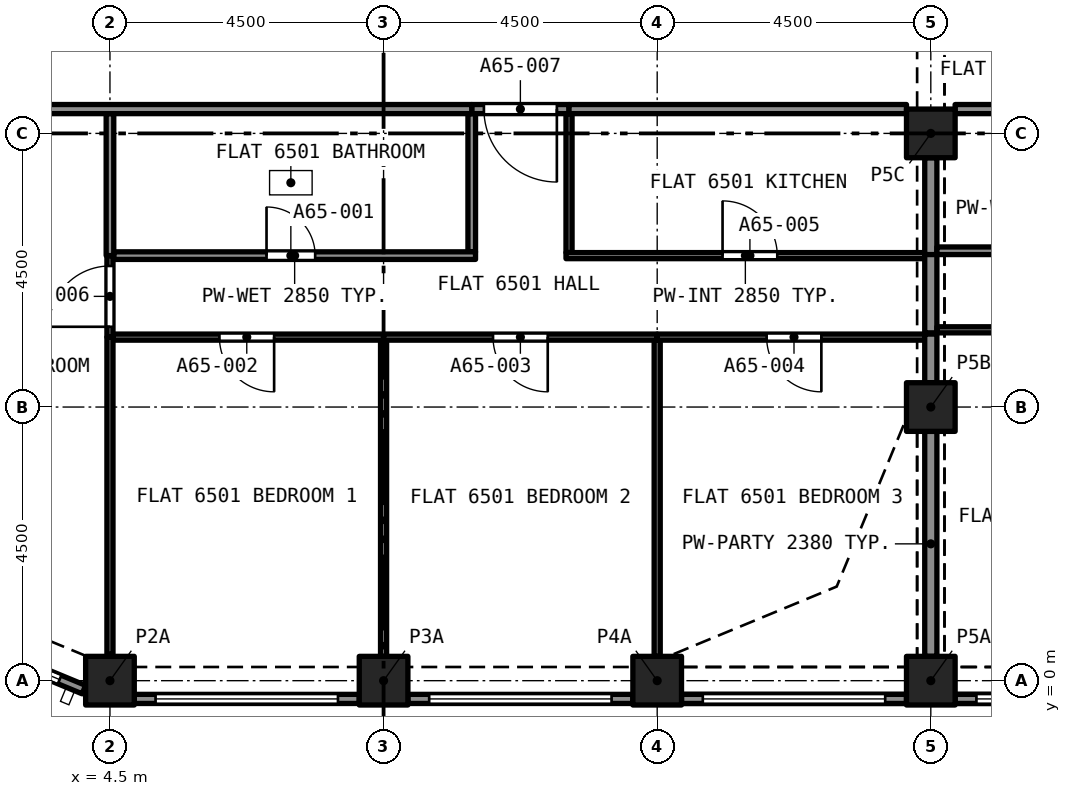
"""IFC4 building model, lengths in metres.
Left out: names, types, materials, properties, quantities, classifications, styles, units other than length and angle.
Written with IfcOpenShell. Run it as: python <this file> out.ifc"""

import sys

from ifc_helpers import new_model, si_unit, direction, frame, frame_2d, origin, origin_2d, place, context, subcontext, project, spatial, rectangle, extrude, element, fill, save


model = new_model("IFC4")
c1 = context("Model", 3, precision=1e-05, world=origin(), true_north=direction((0.0, 1.0)))
c2 = subcontext(c1, "Body", "Model", "MODEL_VIEW")
j1 = project(units=[si_unit("LENGTHUNIT", "METRE"), si_unit("PLANEANGLEUNIT", "RADIAN")], contexts=[c1])
p1 = place(None, origin())
s1 = spatial("IfcSite", under=j1, at=p1, CompositionType="ELEMENT")
p2 = place(p1, origin())
s2 = spatial("IfcBuilding", under=s1, at=p2, CompositionType="ELEMENT")
p3 = place(p2, frame((0.0, 0.0, 232.495)))
s3 = spatial("IfcBuildingStorey", under=s2, at=p3, CompositionType="ELEMENT", Elevation=232.495)
for number, where, z_axis, x_axis in (
    (1, (4.5, 0.0, 0.0), (0.0, 0.0, 1.0), (1.0, 0.0, 0.0)),
    (2, (9.0, 0.0, 0.0), (0.0, 0.0, 1.0), (1.0, 0.0, 0.0)),
    (3, (13.5, 0.0, 0.0), (0.0, 0.0, 1.0), (1.0, 0.0, 0.0)),
    (4, (18.0, 0.0, 0.0), (0.0, 0.0, 1.0), (1.0, 0.0, 0.0)),
    (5, (18.0, 4.5, 0.0), (0.0, 0.0, 1.0), (1.0, 0.0, 0.0)),
    (6, (18.0, 9.0, 0.0), (0.0, 0.0, 1.0), (1.0, 0.0, 0.0)),
):
    element("IfcColumn", number, at=place(p3, frame(where, z_axis=z_axis, x_axis=x_axis)), inside=s3, PredefinedType="COLUMN", context=c2, shape_type="SweptSolid", body=[
        extrude(rectangle(XDim=0.8, YDim=0.8, at=origin_2d()), origin(), (0.0, 0.0, 1.0), 3.2),
    ])
p4 = place(p3, frame((4.071, -0.147, 0.0), z_axis=(0.0, 0.0, 1.0), x_axis=(-0.923885342263, 0.382669406082, 0.0)))
e7 = element("IfcWall", 7, at=p4, inside=s3, PredefinedType="SOLIDWALL", context=c2, shape_type="SweptSolid", body=[
    extrude(rectangle(XDim=2.602, YDim=0.15, at=frame_2d((1.301, 0.0))), origin(), (0.0, 0.0, 1.0), 3.2),
])
p5 = place(p4, frame((0.432, 0.0, 0.45)))
e8 = element("IfcOpeningElement", 8, at=p5, cuts=e7, PredefinedType="OPENING", context=c2, shape_type="SweptSolid", body=[
    extrude(rectangle(XDim=1.9, YDim=1.95, at=frame_2d((0.95, 0.975))), frame((0.0, 0.085, 0.0), z_axis=(0.0, -1.0, 0.0), x_axis=(1.0, 0.0, 0.0)), (0.0, 0.0, 1.0), 0.17),
])
p6 = place(p3, frame((8.6, -0.3, 0.0), z_axis=(0.0, 0.0, 1.0), x_axis=(-1.0, 0.0, 0.0)))
e9 = element("IfcWall", 9, at=p6, inside=s3, PredefinedType="SOLIDWALL", context=c2, shape_type="SweptSolid", body=[
    extrude(rectangle(XDim=3.7, YDim=0.15, at=frame_2d((1.85, 0.0))), origin(), (0.0, 0.0, 1.0), 3.2),
])
p7 = place(p6, frame((0.35, 0.0, 0.45)))
e10 = element("IfcOpeningElement", 10, at=p7, cuts=e9, PredefinedType="OPENING", context=c2, shape_type="SweptSolid", body=[
    extrude(rectangle(XDim=3.0, YDim=1.95, at=frame_2d((1.5, 0.975))), frame((0.0, 0.085, 0.0), z_axis=(0.0, -1.0, 0.0), x_axis=(1.0, 0.0, 0.0)), (0.0, 0.0, 1.0), 0.17),
])
p8 = place(p3, frame((13.1, -0.3, 0.0), z_axis=(0.0, 0.0, 1.0), x_axis=(-1.0, 0.0, 0.0)))
e11 = element("IfcWall", 11, at=p8, inside=s3, PredefinedType="SOLIDWALL", context=c2, shape_type="SweptSolid", body=[
    extrude(rectangle(XDim=3.7, YDim=0.15, at=frame_2d((1.85, 0.0))), origin(), (0.0, 0.0, 1.0), 3.2),
])
p9 = place(p8, frame((0.35, 0.0, 0.45)))
e12 = element("IfcOpeningElement", 12, at=p9, cuts=e11, PredefinedType="OPENING", context=c2, shape_type="SweptSolid", body=[
    extrude(rectangle(XDim=3.0, YDim=1.95, at=frame_2d((1.5, 0.975))), frame((0.0, 0.085, 0.0), z_axis=(0.0, -1.0, 0.0), x_axis=(1.0, 0.0, 0.0)), (0.0, 0.0, 1.0), 0.17),
])
p10 = place(p3, frame((17.6, -0.3, 0.0), z_axis=(0.0, 0.0, 1.0), x_axis=(-1.0, 0.0, 0.0)))
e13 = element("IfcWall", 13, at=p10, inside=s3, PredefinedType="SOLIDWALL", context=c2, shape_type="SweptSolid", body=[
    extrude(rectangle(XDim=3.7, YDim=0.15, at=frame_2d((1.85, 0.0))), origin(), (0.0, 0.0, 1.0), 3.2),
])
p11 = place(p10, frame((0.35, 0.0, 0.45)))
e14 = element("IfcOpeningElement", 14, at=p11, cuts=e13, PredefinedType="OPENING", context=c2, shape_type="SweptSolid", body=[
    extrude(rectangle(XDim=3.0, YDim=1.95, at=frame_2d((1.5, 0.975))), frame((0.0, 0.085, 0.0), z_axis=(0.0, -1.0, 0.0), x_axis=(1.0, 0.0, 0.0)), (0.0, 0.0, 1.0), 0.17),
])
p12 = place(p3, frame((22.1, -0.3, 0.0), z_axis=(0.0, 0.0, 1.0), x_axis=(-1.0, 0.0, 0.0)))
e15 = element("IfcWall", 15, at=p12, inside=s3, PredefinedType="SOLIDWALL", context=c2, shape_type="SweptSolid", body=[
    extrude(rectangle(XDim=3.7, YDim=0.15, at=frame_2d((1.85, 0.0))), origin(), (0.0, 0.0, 1.0), 3.2),
])
p13 = place(p12, frame((0.35, 0.0, 0.45)))
e16 = element("IfcOpeningElement", 16, at=p13, cuts=e15, PredefinedType="OPENING", context=c2, shape_type="SweptSolid", body=[
    extrude(rectangle(XDim=3.0, YDim=1.95, at=frame_2d((1.5, 0.975))), frame((0.0, 0.085, 0.0), z_axis=(0.0, -1.0, 0.0), x_axis=(1.0, 0.0, 0.0)), (0.0, 0.0, 1.0), 0.17),
])
for number, where, z_axis, x_axis in (
    (17, (17.6, -0.3, 3.2), (0.0, 0.0, 1.0), (-1.0, 0.0, 0.0)),
    (18, (22.1, -0.3, 3.2), (0.0, 0.0, 1.0), (-1.0, 0.0, 0.0)),
):
    element("IfcWall", number, at=place(p3, frame(where, z_axis=z_axis, x_axis=x_axis)), inside=s3, PredefinedType="PARAPET", context=c2, shape_type="SweptSolid", body=[
        extrude(rectangle(XDim=3.7, YDim=0.15, at=frame_2d((1.85, 0.0))), origin(), (0.0, 0.0, 1.0), 1.1),
    ])
p14 = place(p3, frame((10.45, 7.052, 0.0), z_axis=(0.0, 0.0, 1.0), x_axis=(0.0, 1.0, 0.0)))
e19 = element("IfcWall", 19, at=p14, inside=s3, PredefinedType="PARTITIONING", context=c2, shape_type="SweptSolid", body=[
    extrude(rectangle(XDim=2.272, YDim=0.125, at=frame_2d((1.136, 0.0))), origin(), (0.0, 0.0, 1.0), 2.85),
])
p15 = place(p3, frame((4.562, 6.99, 0.0), z_axis=(0.0, 0.0, 1.0), x_axis=(1.0, 0.0, 0.0)))
e20 = element("IfcWall", 20, at=p15, inside=s3, PredefinedType="PARTITIONING", context=c2, shape_type="SweptSolid", body=[
    extrude(rectangle(XDim=5.95, YDim=0.125, at=frame_2d((2.975, 0.0))), origin(), (0.0, 0.0, 1.0), 2.85),
])
p16 = place(p15, frame((2.512, 0.0, 0.0)))
e21 = element("IfcOpeningElement", 21, at=p16, cuts=e20, PredefinedType="OPENING", context=c2, shape_type="SweptSolid", body=[
    extrude(rectangle(XDim=0.8, YDim=2.1, at=frame_2d((0.4, 1.05))), frame((0.0, 0.073, 0.0), z_axis=(0.0, -1.0, 0.0), x_axis=(1.0, 0.0, 0.0)), (0.0, 0.0, 1.0), 0.145),
])
p17 = place(p3, frame((4.5, 6.99, 0.0), z_axis=(0.0, 0.0, 1.0), x_axis=(0.0, 1.0, 0.0)))
e22 = element("IfcWall", 22, at=p17, inside=s3, PredefinedType="PARTITIONING", context=c2, shape_type="SweptSolid", body=[
    extrude(rectangle(XDim=2.335, YDim=0.125, at=frame_2d((1.167, 0.0))), origin(), (0.0, 0.0, 1.0), 2.85),
])
p18 = place(p3, frame((9.0, 0.4, 0.0), z_axis=(0.0, 0.0, 1.0), x_axis=(0.0, 1.0, 0.0)))
e23 = element("IfcWall", 23, at=p18, inside=s3, PredefinedType="PARTITIONING", context=c2, shape_type="SweptSolid", body=[
    extrude(rectangle(XDim=5.2, YDim=0.1, at=frame_2d((2.6, 0.0))), origin(), (0.0, 0.0, 1.0), 2.85),
])
p19 = place(p3, frame((9.0, 5.65, 0.0), z_axis=(0.0, 0.0, 1.0), x_axis=(-1.0, 0.0, 0.0)))
e24 = element("IfcWall", 24, at=p19, inside=s3, PredefinedType="PARTITIONING", context=c2, shape_type="SweptSolid", body=[
    extrude(rectangle(XDim=4.45, YDim=0.1, at=frame_2d((2.225, 0.0))), origin(), (0.0, 0.0, 1.0), 2.85),
])
p20 = place(p19, frame((1.8, 0.0, 0.0)))
e25 = element("IfcOpeningElement", 25, at=p20, cuts=e24, PredefinedType="OPENING", context=c2, shape_type="SweptSolid", body=[
    extrude(rectangle(XDim=0.9, YDim=2.1, at=frame_2d((0.45, 1.05))), frame((0.0, 0.06, 0.0), z_axis=(0.0, -1.0, 0.0), x_axis=(1.0, 0.0, 0.0)), (0.0, 0.0, 1.0), 0.12),
])
p21 = place(p3, frame((4.5, 0.433, 0.0), z_axis=(0.0, 0.0, 1.0), x_axis=(0.0, 1.0, 0.0)))
e26 = element("IfcWall", 26, at=p21, inside=s3, PredefinedType="PARTITIONING", context=c2, shape_type="SweptSolid", body=[
    extrude(rectangle(XDim=5.217, YDim=0.1, at=frame_2d((2.608, 0.0))), origin(), (0.0, 0.0, 1.0), 2.85),
])
p22 = place(p3, frame((13.5, 0.4, 0.0), z_axis=(0.0, 0.0, 1.0), x_axis=(0.0, 1.0, 0.0)))
e27 = element("IfcWall", 27, at=p22, inside=s3, PredefinedType="PARTITIONING", context=c2, shape_type="SweptSolid", body=[
    extrude(rectangle(XDim=5.2, YDim=0.1, at=frame_2d((2.6, 0.0))), origin(), (0.0, 0.0, 1.0), 2.85),
])
p23 = place(p3, frame((13.5, 5.65, 0.0), z_axis=(0.0, 0.0, 1.0), x_axis=(-1.0, 0.0, 0.0)))
e28 = element("IfcWall", 28, at=p23, inside=s3, PredefinedType="PARTITIONING", context=c2, shape_type="SweptSolid", body=[
    extrude(rectangle(XDim=4.5, YDim=0.1, at=frame_2d((2.25, 0.0))), origin(), (0.0, 0.0, 1.0), 2.85),
])
p24 = place(p23, frame((1.8, 0.0, 0.0)))
e29 = element("IfcOpeningElement", 29, at=p24, cuts=e28, PredefinedType="OPENING", context=c2, shape_type="SweptSolid", body=[
    extrude(rectangle(XDim=0.9, YDim=2.1, at=frame_2d((0.45, 1.05))), frame((0.0, 0.06, 0.0), z_axis=(0.0, -1.0, 0.0), x_axis=(1.0, 0.0, 0.0)), (0.0, 0.0, 1.0), 0.12),
])
p25 = place(p3, frame((17.9, 5.65, 0.0), z_axis=(0.0, 0.0, 1.0), x_axis=(-1.0, 0.0, 0.0)))
e30 = element("IfcWall", 30, at=p25, inside=s3, PredefinedType="PARTITIONING", context=c2, shape_type="SweptSolid", body=[
    extrude(rectangle(XDim=4.4, YDim=0.1, at=frame_2d((2.2, 0.0))), origin(), (0.0, 0.0, 1.0), 2.85),
])
p26 = place(p25, frame((1.7, 0.0, 0.0)))
e31 = element("IfcOpeningElement", 31, at=p26, cuts=e30, PredefinedType="OPENING", context=c2, shape_type="SweptSolid", body=[
    extrude(rectangle(XDim=0.9, YDim=2.1, at=frame_2d((0.45, 1.05))), frame((0.0, 0.06, 0.0), z_axis=(0.0, -1.0, 0.0), x_axis=(1.0, 0.0, 0.0)), (0.0, 0.0, 1.0), 0.12),
])
p27 = place(p3, frame((18.0, 4.9, 0.0), z_axis=(0.0, 0.0, 1.0), x_axis=(0.0, 1.0, 0.0)))
e32 = element("IfcWall", 32, at=p27, inside=s3, PredefinedType="PARTITIONING", context=c2, shape_type="SweptSolid", body=[
    extrude(rectangle(XDim=0.8, YDim=0.2, at=frame_2d((0.4, 0.0))), origin(), (0.0, 0.0, 1.0), 2.38),
])
p28 = place(p3, frame((18.0, 0.4, 0.0), z_axis=(0.0, 0.0, 1.0), x_axis=(0.0, 1.0, 0.0)))
e33 = element("IfcWall", 33, at=p28, inside=s3, PredefinedType="PARTITIONING", context=c2, shape_type="SweptSolid", body=[
    extrude(rectangle(XDim=3.7, YDim=0.2, at=frame_2d((1.85, 0.0))), origin(), (0.0, 0.0, 1.0), 2.38),
])
p29 = place(p3, frame((12.05, 7.04, 0.0), z_axis=(0.0, 0.0, 1.0), x_axis=(0.0, 1.0, 0.0)))
e34 = element("IfcWall", 34, at=p29, inside=s3, PredefinedType="PARTITIONING", context=c2, shape_type="SweptSolid", body=[
    extrude(rectangle(XDim=2.285, YDim=0.1, at=frame_2d((1.143, 0.0))), origin(), (0.0, 0.0, 1.0), 2.85),
])
p30 = place(p3, frame((12.0, 6.99, 0.0), z_axis=(0.0, 0.0, 1.0), x_axis=(1.0, 0.0, 0.0)))
e35 = element("IfcWall", 35, at=p30, inside=s3, PredefinedType="PARTITIONING", context=c2, shape_type="SweptSolid", body=[
    extrude(rectangle(XDim=5.9, YDim=0.1, at=frame_2d((2.95, 0.0))), origin(), (0.0, 0.0, 1.0), 2.85),
])
p31 = place(p30, frame((2.575, 0.0, 0.0)))
e36 = element("IfcOpeningElement", 36, at=p31, cuts=e35, PredefinedType="OPENING", context=c2, shape_type="SweptSolid", body=[
    extrude(rectangle(XDim=0.9, YDim=2.1, at=frame_2d((0.45, 1.05))), frame((0.0, 0.06, 0.0), z_axis=(0.0, -1.0, 0.0), x_axis=(1.0, 0.0, 0.0)), (0.0, 0.0, 1.0), 0.12),
])
p32 = place(p3, frame((4.5, 5.65, 0.0), z_axis=(0.0, 0.0, 1.0), x_axis=(0.0, 1.0, 0.0)))
e37 = element("IfcWall", 37, at=p32, inside=s3, PredefinedType="PARTITIONING", context=c2, shape_type="SweptSolid", body=[
    extrude(rectangle(XDim=1.34, YDim=0.1, at=frame_2d((0.67, 0.0))), origin(), (0.0, 0.0, 1.0), 2.85),
])
p33 = place(p32, frame((0.17, 0.0, 0.0)))
e38 = element("IfcOpeningElement", 38, at=p33, cuts=e37, PredefinedType="OPENING", context=c2, shape_type="SweptSolid", body=[
    extrude(rectangle(XDim=1.0, YDim=2.1, at=frame_2d((0.5, 1.05))), frame((0.0, 0.06, 0.0), z_axis=(0.0, -1.0, 0.0), x_axis=(1.0, 0.0, 0.0)), (0.0, 0.0, 1.0), 0.12),
])
p34 = place(p3, frame((18.0, 5.72, 0.0), z_axis=(0.0, 0.0, 1.0), x_axis=(0.0, 1.0, 0.0)))
e39 = element("IfcWall", 39, at=p34, inside=s3, PredefinedType="PARTITIONING", context=c2, shape_type="SweptSolid", body=[
    extrude(rectangle(XDim=1.32, YDim=0.2, at=frame_2d((0.66, 0.0))), origin(), (0.0, 0.0, 1.0), 2.38),
])
p35 = place(p3, frame((12.05, 9.4, 0.0), z_axis=(0.0, 0.0, 1.0), x_axis=(-1.0, 0.0, 0.0)))
e40 = element("IfcWall", 40, at=p35, inside=s3, PredefinedType="PARTITIONING", context=c2, shape_type="SweptSolid", body=[
    extrude(rectangle(XDim=1.6, YDim=0.15, at=frame_2d((0.8, 0.0))), origin(), (0.0, 0.0, 1.0), 2.85),
])
p36 = place(p35, frame((0.2, 0.0, 0.0)))
e41 = element("IfcOpeningElement", 41, at=p36, cuts=e40, PredefinedType="OPENING", context=c2, shape_type="SweptSolid", body=[
    extrude(rectangle(XDim=1.2, YDim=2.4, at=frame_2d((0.6, 1.2))), frame((0.0, 0.085, 0.0), z_axis=(0.0, -1.0, 0.0), x_axis=(1.0, 0.0, 0.0)), (0.0, 0.0, 1.0), 0.17),
])
p37 = place(p3, frame((18.0, 7.008, 0.0), z_axis=(0.0, 0.0, 1.0), x_axis=(0.0, 1.0, 0.0)))
e42 = element("IfcWall", 42, at=p37, inside=s3, PredefinedType="PARTITIONING", context=c2, shape_type="SweptSolid", body=[
    extrude(rectangle(XDim=1.593, YDim=0.2, at=frame_2d((0.796, 0.0))), origin(), (0.0, 0.0, 1.0), 2.38),
])
p38 = place(p3, frame((12.05, 9.4, 0.0), z_axis=(0.0, 0.0, 1.0), x_axis=(1.0, 0.0, 0.0)))
e43 = element("IfcWall", 43, at=p38, inside=s3, PredefinedType="PARTITIONING", context=c2, shape_type="SweptSolid", body=[
    extrude(rectangle(XDim=5.55, YDim=0.15, at=frame_2d((2.775, 0.0))), origin(), (0.0, 0.0, 1.0), 2.85),
])
p39 = place(p3, frame((0.4, 9.4, 0.0), z_axis=(0.0, 0.0, 1.0), x_axis=(1.0, 0.0, 0.0)))
e44 = element("IfcWall", 44, at=p39, inside=s3, PredefinedType="PARTITIONING", context=c2, shape_type="SweptSolid", body=[
    extrude(rectangle(XDim=10.05, YDim=0.15, at=frame_2d((5.025, 0.0))), origin(), (0.0, 0.0, 1.0), 2.85),
])
p40 = place(p3, frame((18.1, 7.07, 0.0), z_axis=(0.0, 0.0, 1.0), x_axis=(1.0, 0.0, 0.0)))
e45 = element("IfcWall", 45, at=p40, inside=s3, PredefinedType="PARTITIONING", context=c2, shape_type="SweptSolid", body=[
    extrude(rectangle(XDim=3.662, YDim=0.125, at=frame_2d((1.831, 0.0))), origin(), (0.0, 0.0, 1.0), 2.75),
])
p41 = place(p40, frame((1.35, 0.0, 0.0)))
e46 = element("IfcOpeningElement", 46, at=p41, cuts=e45, PredefinedType="OPENING", context=c2, shape_type="SweptSolid", body=[
    extrude(rectangle(XDim=0.8, YDim=2.1, at=frame_2d((0.4, 1.05))), frame((0.0, 0.073, 0.0), z_axis=(0.0, -1.0, 0.0), x_axis=(1.0, 0.0, 0.0)), (0.0, 0.0, 1.0), 0.145),
])
p42 = place(p3, frame((18.4, 9.4, 0.0), z_axis=(0.0, 0.0, 1.0), x_axis=(1.0, 0.0, 0.0)))
e47 = element("IfcWall", 47, at=p42, inside=s3, PredefinedType="PARTITIONING", context=c2, shape_type="SweptSolid", body=[
    extrude(rectangle(XDim=3.3, YDim=0.15, at=frame_2d((1.65, 0.0))), origin(), (0.0, 0.0, 1.0), 2.75),
])
p43 = place(p3, frame((22.5, 5.77, 0.0), z_axis=(0.0, 0.0, 1.0), x_axis=(-1.0, 0.0, 0.0)))
e48 = element("IfcWall", 48, at=p43, inside=s3, PredefinedType="PARTITIONING", context=c2, shape_type="SweptSolid", body=[
    extrude(rectangle(XDim=4.4, YDim=0.1, at=frame_2d((2.2, 0.0))), origin(), (0.0, 0.0, 1.0), 2.75),
])
p44 = place(p43, frame((1.8, 0.0, 0.0)))
e49 = element("IfcOpeningElement", 49, at=p44, cuts=e48, PredefinedType="OPENING", context=c2, shape_type="SweptSolid", body=[
    extrude(rectangle(XDim=0.9, YDim=2.1, at=frame_2d((0.45, 1.05))), frame((0.0, 0.06, 0.0), z_axis=(0.0, -1.0, 0.0), x_axis=(1.0, 0.0, 0.0)), (0.0, 0.0, 1.0), 0.12),
])
p45 = place(p5, origin())
e50 = element("IfcWindow", 50, at=p45, inside=s3, PartitioningType="SINGLE_PANEL", PredefinedType="WINDOW", context=c2, shape_type="SweptSolid", body=[
    extrude(rectangle(XDim=1.9, YDim=1.95, at=frame_2d((0.95, 0.975))), frame((0.0, 0.03, 0.0), z_axis=(0.0, -1.0, 0.0), x_axis=(1.0, 0.0, 0.0)), (0.0, 0.0, 1.0), 0.06),
])
fill(e8, e50)
p46 = place(p7, origin())
e51 = element("IfcWindow", 51, at=p46, inside=s3, PartitioningType="SINGLE_PANEL", PredefinedType="WINDOW", context=c2, shape_type="SweptSolid", body=[
    extrude(rectangle(XDim=3.0, YDim=1.95, at=frame_2d((1.5, 0.975))), frame((0.0, 0.03, 0.0), z_axis=(0.0, -1.0, 0.0), x_axis=(1.0, 0.0, 0.0)), (0.0, 0.0, 1.0), 0.06),
])
fill(e10, e51)
p47 = place(p9, origin())
e52 = element("IfcWindow", 52, at=p47, inside=s3, PartitioningType="SINGLE_PANEL", PredefinedType="WINDOW", context=c2, shape_type="SweptSolid", body=[
    extrude(rectangle(XDim=3.0, YDim=1.95, at=frame_2d((1.5, 0.975))), frame((0.0, 0.03, 0.0), z_axis=(0.0, -1.0, 0.0), x_axis=(1.0, 0.0, 0.0)), (0.0, 0.0, 1.0), 0.06),
])
fill(e12, e52)
p48 = place(p11, origin())
e53 = element("IfcWindow", 53, at=p48, inside=s3, PartitioningType="SINGLE_PANEL", PredefinedType="WINDOW", context=c2, shape_type="SweptSolid", body=[
    extrude(rectangle(XDim=3.0, YDim=1.95, at=frame_2d((1.5, 0.975))), frame((0.0, 0.03, 0.0), z_axis=(0.0, -1.0, 0.0), x_axis=(1.0, 0.0, 0.0)), (0.0, 0.0, 1.0), 0.06),
])
fill(e14, e53)
p49 = place(p13, origin())
e54 = element("IfcWindow", 54, at=p49, inside=s3, PartitioningType="SINGLE_PANEL", PredefinedType="WINDOW", context=c2, shape_type="SweptSolid", body=[
    extrude(rectangle(XDim=3.0, YDim=1.95, at=frame_2d((1.5, 0.975))), frame((0.0, 0.03, 0.0), z_axis=(0.0, -1.0, 0.0), x_axis=(1.0, 0.0, 0.0)), (0.0, 0.0, 1.0), 0.06),
])
fill(e16, e54)
p50 = place(p16, origin())
e55 = element("IfcDoor", 55, at=p50, inside=s3, OperationType="SINGLE_SWING_LEFT", PredefinedType="DOOR", context=c2, shape_type="SweptSolid", body=[
    extrude(rectangle(XDim=0.8, YDim=2.1, at=frame_2d((0.4, 1.05))), frame((0.0, 0.025, 0.0), z_axis=(0.0, -1.0, 0.0), x_axis=(1.0, 0.0, 0.0)), (0.0, 0.0, 1.0), 0.05),
])
fill(e21, e55)
p51 = place(p20, origin())
e56 = element("IfcDoor", 56, at=p51, inside=s3, OperationType="SINGLE_SWING_RIGHT", PredefinedType="DOOR", context=c2, shape_type="SweptSolid", body=[
    extrude(rectangle(XDim=0.9, YDim=2.1, at=frame_2d((0.45, 1.05))), frame((0.0, 0.025, 0.0), z_axis=(0.0, -1.0, 0.0), x_axis=(1.0, 0.0, 0.0)), (0.0, 0.0, 1.0), 0.05),
])
fill(e25, e56)
p52 = place(p24, origin())
e57 = element("IfcDoor", 57, at=p52, inside=s3, OperationType="SINGLE_SWING_LEFT", PredefinedType="DOOR", context=c2, shape_type="SweptSolid", body=[
    extrude(rectangle(XDim=0.9, YDim=2.1, at=frame_2d((0.45, 1.05))), frame((0.0, 0.025, 0.0), z_axis=(0.0, -1.0, 0.0), x_axis=(1.0, 0.0, 0.0)), (0.0, 0.0, 1.0), 0.05),
])
fill(e29, e57)
p53 = place(p26, origin())
e58 = element("IfcDoor", 58, at=p53, inside=s3, OperationType="SINGLE_SWING_LEFT", PredefinedType="DOOR", context=c2, shape_type="SweptSolid", body=[
    extrude(rectangle(XDim=0.9, YDim=2.1, at=frame_2d((0.45, 1.05))), frame((0.0, 0.025, 0.0), z_axis=(0.0, -1.0, 0.0), x_axis=(1.0, 0.0, 0.0)), (0.0, 0.0, 1.0), 0.05),
])
fill(e31, e58)
p54 = place(p31, origin())
e59 = element("IfcDoor", 59, at=p54, inside=s3, OperationType="SINGLE_SWING_RIGHT", PredefinedType="DOOR", context=c2, shape_type="SweptSolid", body=[
    extrude(rectangle(XDim=0.9, YDim=2.1, at=frame_2d((0.45, 1.05))), frame((0.0, 0.025, 0.0), z_axis=(0.0, -1.0, 0.0), x_axis=(1.0, 0.0, 0.0)), (0.0, 0.0, 1.0), 0.05),
])
fill(e36, e59)
p55 = place(p33, origin())
e60 = element("IfcDoor", 60, at=p55, inside=s3, OperationType="SINGLE_SWING_RIGHT", PredefinedType="DOOR", context=c2, shape_type="SweptSolid", body=[
    extrude(rectangle(XDim=1.0, YDim=2.1, at=frame_2d((0.5, 1.05))), frame((0.0, 0.025, 0.0), z_axis=(0.0, -1.0, 0.0), x_axis=(1.0, 0.0, 0.0)), (0.0, 0.0, 1.0), 0.05),
])
fill(e38, e60)
p56 = place(p36, origin())
e61 = element("IfcDoor", 61, at=p56, inside=s3, OperationType="SINGLE_SWING_LEFT", PredefinedType="DOOR", context=c2, shape_type="SweptSolid", body=[
    extrude(rectangle(XDim=1.2, YDim=2.4, at=frame_2d((0.6, 1.2))), frame((0.0, 0.025, 0.0), z_axis=(0.0, -1.0, 0.0), x_axis=(1.0, 0.0, 0.0)), (0.0, 0.0, 1.0), 0.05),
])
fill(e41, e61)
save(model, sys.argv[1])
